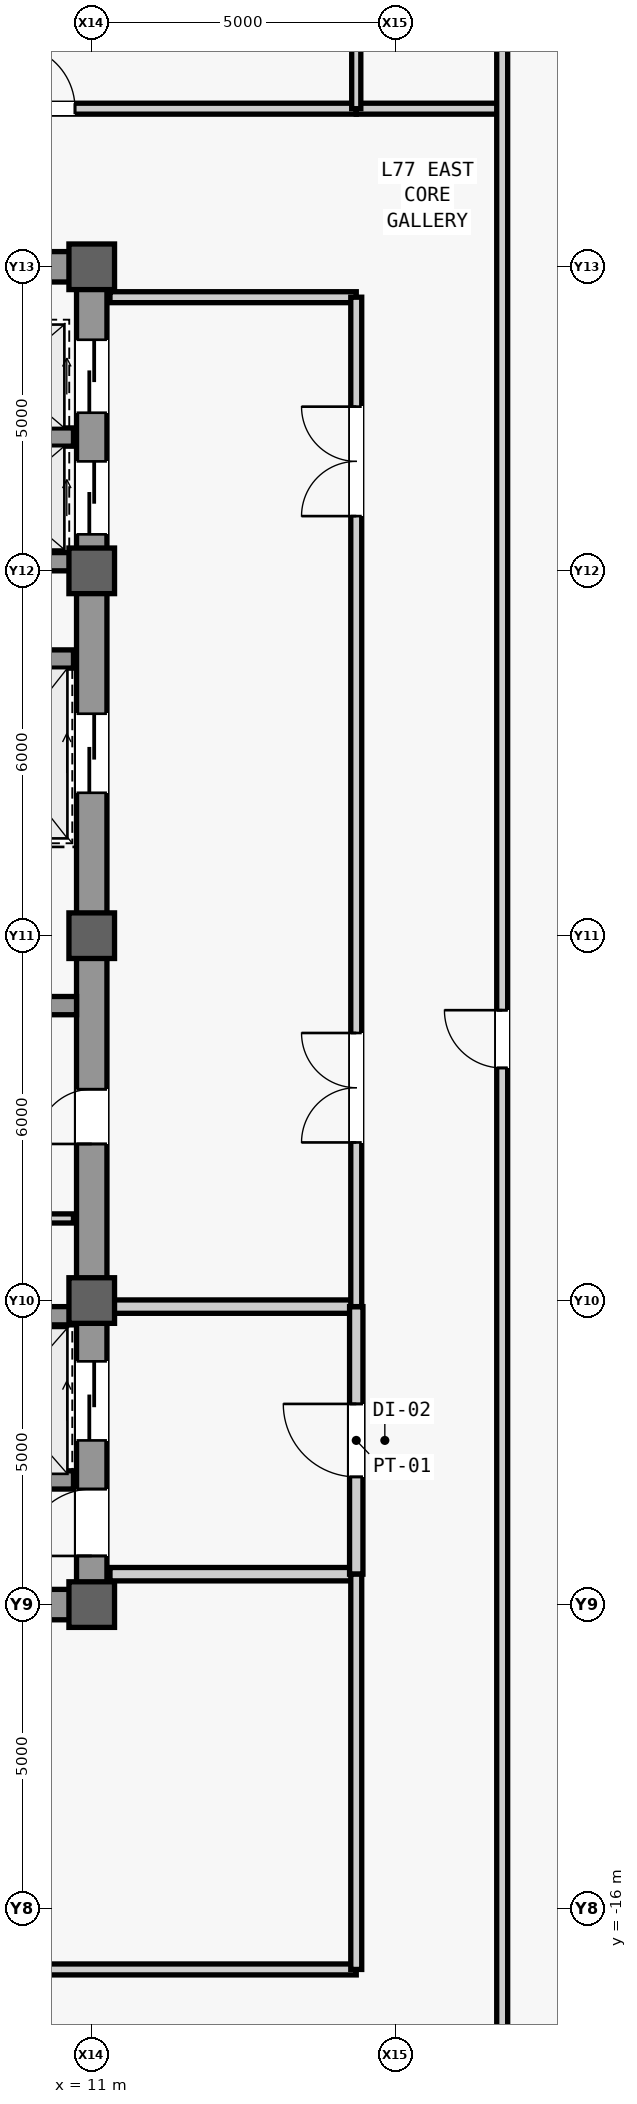
"""IFC4 building model, lengths in metres.
Left out: names, types, materials, properties, quantities, classifications, styles, units other than length and angle.
Written with IfcOpenShell. Run it as: python <this file> out.ifc"""

import sys

from ifc_helpers import new_model, si_unit, direction, frame, frame_2d, origin, origin_2d, place, context, subcontext, project, spatial, rectangle, extrude, source, transform, mapped, element, fill, save


model = new_model("IFC4")
c1 = context("Model", 3, precision=1e-05, world=origin(), true_north=direction((0.0, 1.0)))
c2 = subcontext(c1, "Body", "Model", "MODEL_VIEW")
j1 = project(units=[si_unit("LENGTHUNIT", "METRE"), si_unit("PLANEANGLEUNIT", "RADIAN")], contexts=[c1])
p1 = place(None, origin())
s1 = spatial("IfcSite", under=j1, at=p1, CompositionType="ELEMENT")
p2 = place(p1, origin())
s2 = spatial("IfcBuilding", under=s1, at=p2, CompositionType="ELEMENT")
p3 = place(p2, frame((0.0, 0.0, 326.3)))
s3 = spatial("IfcBuildingStorey", under=s2, at=p3, CompositionType="ELEMENT", Elevation=326.3)
m1 = source(origin(), c2, "Body", "SweptSolid", [
    extrude(rectangle(XDim=22.0, YDim=0.5, at=frame_2d((11.0, 0.0))), origin(), (0.0, 0.0, 1.0), 3.74),
])
p4 = place(p3, frame((11.0, -11.0, 0.0), z_axis=(0.0, 0.0, 1.0), x_axis=(0.0, 1.0, 0.0)))
e1 = element("IfcWall", 1, at=p4, inside=s3, PredefinedType="SHEAR", context=c2, shape_type="MappedRepresentation", body=[
    mapped(m1, transform((0.0, 0.0, 0.0), scale=1.0)),
])
m2 = source(origin(), c2, "Body", "SweptSolid", [
    extrude(rectangle(XDim=1.1, YDim=2.2, at=frame_2d((0.55, 1.1))), frame((0.0, 0.26, 0.0), z_axis=(0.0, -1.0, 0.0), x_axis=(1.0, 0.0, 0.0)), (0.0, 0.0, 1.0), 0.52),
])
p5 = place(p4, frame((0.8, 0.0, 0.0)))
e2 = element("IfcOpeningElement", 2, at=p5, cuts=e1, PredefinedType="OPENING", context=c2, shape_type="MappedRepresentation", body=[
    mapped(m2, transform((0.0, 0.0, 0.0), scale=1.0)),
])
m3 = source(origin(), c2, "Body", "SweptSolid", [
    extrude(rectangle(XDim=0.9, YDim=2.15, at=frame_2d((0.45, 1.075))), frame((0.0, 0.26, 0.0), z_axis=(0.0, -1.0, 0.0), x_axis=(1.0, 0.0, 0.0)), (0.0, 0.0, 1.0), 0.52),
])
p6 = place(p4, frame((7.575, 0.0, 0.0)))
e3 = element("IfcOpeningElement", 3, at=p6, cuts=e1, PredefinedType="OPENING", context=c2, shape_type="MappedRepresentation", body=[
    mapped(m3, transform((0.0, 0.0, 0.0), scale=1.0)),
])
m4 = source(origin(), c2, "Body", "SweptSolid", [
    extrude(rectangle(XDim=1.2, YDim=2.3, at=frame_2d((0.6, 1.15))), frame((0.0, 0.26, 0.0), z_axis=(0.0, -1.0, 0.0), x_axis=(1.0, 0.0, 0.0)), (0.0, 0.0, 1.0), 0.52),
])
p7 = place(p4, frame((17.6, 0.0, 0.0)))
e4 = element("IfcOpeningElement", 4, at=p7, cuts=e1, PredefinedType="OPENING", context=c2, shape_type="MappedRepresentation", body=[
    mapped(m4, transform((0.0, 0.0, 0.0), scale=1.0)),
])
p8 = place(p4, frame((19.6, 0.0, 0.0)))
e5 = element("IfcOpeningElement", 5, at=p8, cuts=e1, PredefinedType="OPENING", context=c2, shape_type="MappedRepresentation", body=[
    mapped(m4, transform((0.0, 0.0, 0.0), scale=1.0)),
])
m5 = source(origin(), c2, "Body", "SweptSolid", [
    extrude(rectangle(XDim=1.3, YDim=2.3, at=frame_2d((0.65, 1.15))), frame((0.0, 0.26, 0.0), z_axis=(0.0, -1.0, 0.0), x_axis=(1.0, 0.0, 0.0)), (0.0, 0.0, 1.0), 0.52),
])
p9 = place(p4, frame((2.7, 0.0, 0.0)))
e6 = element("IfcOpeningElement", 6, at=p9, cuts=e1, PredefinedType="OPENING", context=c2, shape_type="MappedRepresentation", body=[
    mapped(m5, transform((0.0, 0.0, 0.0), scale=1.0)),
])
p10 = place(p4, frame((13.35, 0.0, 0.0)))
e7 = element("IfcOpeningElement", 7, at=p10, cuts=e1, PredefinedType="OPENING", context=c2, shape_type="MappedRepresentation", body=[
    mapped(m5, transform((0.0, 0.0, 0.0), scale=1.0)),
])
m6 = source(origin(), c2, "Body", "SweptSolid", [
    extrude(rectangle(XDim=5.9, YDim=0.5, at=frame_2d((2.95, 0.0))), origin(), (0.0, 0.0, 1.0), 3.74),
])
p11 = place(p3, frame((4.85, -11.0, 0.0), z_axis=(0.0, 0.0, 1.0), x_axis=(1.0, 0.0, 0.0)))
e8 = element("IfcWall", 8, at=p11, inside=s3, PredefinedType="SHEAR", context=c2, shape_type="MappedRepresentation", body=[
    mapped(m6, transform((0.0, 0.0, 0.0), scale=1.0)),
])
p12 = place(p3, frame((4.85, 11.0, 0.0), z_axis=(0.0, 0.0, 1.0), x_axis=(1.0, 0.0, 0.0)))
e9 = element("IfcWall", 9, at=p12, inside=s3, PredefinedType="SHEAR", context=c2, shape_type="MappedRepresentation", body=[
    mapped(m6, transform((0.0, 0.0, 0.0), scale=1.0)),
])
p13 = place(p12, frame((0.5, 0.0, 0.0)))
e10 = element("IfcOpeningElement", 10, at=p13, cuts=e9, PredefinedType="OPENING", context=c2, shape_type="MappedRepresentation", body=[
    mapped(m3, transform((0.0, 0.0, 0.0), scale=1.0)),
])
m7 = source(origin(), c2, "Body", "SweptSolid", [
    extrude(rectangle(XDim=5.65, YDim=0.3, at=frame_2d((2.825, 0.0))), origin(), (0.0, 0.0, 1.0), 3.74),
])
p14 = place(p3, frame((5.1, -1.15, 0.0), z_axis=(0.0, 0.0, 1.0), x_axis=(1.0, 0.0, 0.0)))
e11 = element("IfcWall", 11, at=p14, inside=s3, PredefinedType="SHEAR", context=c2, shape_type="MappedRepresentation", body=[
    mapped(m7, transform((0.0, 0.0, 0.0), scale=1.0)),
])
m8 = source(origin(), c2, "Body", "SweptSolid", [
    extrude(rectangle(XDim=0.75, YDim=0.75, at=origin_2d()), origin(), (0.0, 0.0, 1.0), 4.0),
])
for number, where, z_axis, x_axis in (
    (12, (11.0, -11.0, 0.0), (0.0, 0.0, 1.0), (1.0, 0.0, 0.0)),
    (13, (11.0, -6.0, 0.0), (0.0, 0.0, 1.0), (1.0, 0.0, 0.0)),
    (14, (11.0, 0.0, 0.0), (0.0, 0.0, 1.0), (1.0, 0.0, 0.0)),
    (15, (11.0, 6.0, 0.0), (0.0, 0.0, 1.0), (1.0, 0.0, 0.0)),
    (16, (11.0, 11.0, 0.0), (0.0, 0.0, 1.0), (1.0, 0.0, 0.0)),
):
    element("IfcColumn", number, at=place(p3, frame(where, z_axis=z_axis, x_axis=x_axis)), inside=s3, PredefinedType="COLUMN", context=c2, shape_type="MappedRepresentation", body=[
        mapped(m8, transform((0.0, 0.0, 0.0), scale=1.0)),
    ])
m9 = source(origin(), c2, "Body", "SweptSolid", [
    extrude(rectangle(XDim=2.2, YDim=0.3, at=frame_2d((1.1, 0.0))), origin(), (0.0, 0.0, 1.0), 3.74),
])
for number, where, z_axis, x_axis in (
    (17, (8.5, -8.95, 0.0), (0.0, 0.0, 1.0), (1.0, 0.0, 0.0)),
    (18, (8.5, -6.25, 0.0), (0.0, 0.0, 1.0), (1.0, 0.0, 0.0)),
):
    element("IfcWall", number, at=place(p3, frame(where, z_axis=z_axis, x_axis=x_axis)), inside=s3, PredefinedType="SHEAR", context=c2, shape_type="MappedRepresentation", body=[
        mapped(m9, transform((0.0, 0.0, 0.0), scale=1.0)),
    ])
m10 = source(origin(), c2, "Body", "SweptSolid", [
    extrude(rectangle(XDim=2.3, YDim=0.3, at=frame_2d((1.15, 0.0))), origin(), (0.0, 0.0, 1.0), 3.74),
])
for number, where, z_axis, x_axis in (
    (19, (8.4, 4.55, 0.0), (0.0, 0.0, 1.0), (1.0, 0.0, 0.0)),
    (20, (8.4, 6.15, 0.0), (0.0, 0.0, 1.0), (1.0, 0.0, 0.0)),
    (21, (8.4, 8.2, 0.0), (0.0, 0.0, 1.0), (1.0, 0.0, 0.0)),
):
    element("IfcWall", number, at=place(p3, frame(where, z_axis=z_axis, x_axis=x_axis)), inside=s3, PredefinedType="SHEAR", context=c2, shape_type="MappedRepresentation", body=[
        mapped(m10, transform((0.0, 0.0, 0.0), scale=1.0)),
    ])
m11 = source(origin(), c2, "Body", "SweptSolid", [
    extrude(rectangle(XDim=2.05, YDim=0.15, at=frame_2d((1.025, 0.0))), origin(), (0.0, 0.0, 1.0), 3.74),
])
p15 = place(p3, frame((8.65, -4.65, 0.0), z_axis=(0.0, 0.0, 1.0), x_axis=(1.0, 0.0, 0.0)))
e22 = element("IfcWall", 22, at=p15, inside=s3, PredefinedType="PARTITIONING", context=c2, shape_type="MappedRepresentation", body=[
    mapped(m11, transform((0.0, 0.0, 0.0), scale=1.0)),
])
m12 = source(origin(), c2, "Body", "SweptSolid", [
    extrude(rectangle(XDim=4.05, YDim=0.22, at=frame_2d((2.025, 0.0))), origin(), (0.0, 0.0, 1.0), 3.74),
])
p16 = place(p3, frame((11.3, -10.5, 0.0), z_axis=(0.0, 0.0, 1.0), x_axis=(1.0, 0.0, 0.0)))
e23 = element("IfcWall", 23, at=p16, inside=s3, PredefinedType="PARTITIONING", context=c2, shape_type="MappedRepresentation", body=[
    mapped(m12, transform((0.0, 0.0, 0.0), scale=1.0)),
])
m13 = source(origin(), c2, "Body", "SweptSolid", [
    extrude(rectangle(XDim=4.05, YDim=0.22, at=frame_2d((2.025, 0.0))), origin(), (0.0, 0.0, 1.0), 3.124),
])
p17 = place(p3, frame((11.3, -6.1, 0.0), z_axis=(0.0, 0.0, 1.0), x_axis=(1.0, 0.0, 0.0)))
e24 = element("IfcWall", 24, at=p17, inside=s3, PredefinedType="PARTITIONING", context=c2, shape_type="MappedRepresentation", body=[
    mapped(m13, transform((0.0, 0.0, 0.0), scale=1.0)),
])
m14 = source(origin(), c2, "Body", "SweptSolid", [
    extrude(rectangle(XDim=4.4, YDim=0.22, at=frame_2d((2.2, 0.0))), origin(), (0.0, 0.0, 1.0), 3.74),
])
p18 = place(p3, frame((15.35, -10.5, 0.0), z_axis=(0.0, 0.0, 1.0), x_axis=(0.0, 1.0, 0.0)))
e25 = element("IfcWall", 25, at=p18, inside=s3, PredefinedType="PARTITIONING", context=c2, shape_type="MappedRepresentation", body=[
    mapped(m14, transform((0.0, 0.0, 0.0), scale=1.0)),
])
m15 = source(origin(), c2, "Body", "SweptSolid", [
    extrude(rectangle(XDim=1.2, YDim=2.2, at=frame_2d((0.6, 1.1))), frame((0.0, 0.12, 0.0), z_axis=(0.0, -1.0, 0.0), x_axis=(1.0, 0.0, 0.0)), (0.0, 0.0, 1.0), 0.24),
])
p19 = place(p18, frame((1.6, 0.0, 0.0)))
e26 = element("IfcOpeningElement", 26, at=p19, cuts=e25, PredefinedType="OPENING", context=c2, shape_type="MappedRepresentation", body=[
    mapped(m15, transform((0.0, 0.0, 0.0), scale=1.0)),
])
m16 = source(origin(), c2, "Body", "SweptSolid", [
    extrude(rectangle(XDim=4.05, YDim=0.18, at=frame_2d((2.025, 0.0))), origin(), (0.0, 0.0, 1.0), 3.74),
])
p20 = place(p3, frame((11.3, 10.5, 0.0), z_axis=(0.0, 0.0, 1.0), x_axis=(1.0, 0.0, 0.0)))
e27 = element("IfcWall", 27, at=p20, inside=s3, PredefinedType="PARTITIONING", context=c2, shape_type="MappedRepresentation", body=[
    mapped(m16, transform((0.0, 0.0, 0.0), scale=1.0)),
])
m17 = source(origin(), c2, "Body", "SweptSolid", [
    extrude(rectangle(XDim=16.6, YDim=0.18, at=frame_2d((8.3, 0.0))), origin(), (0.0, 0.0, 1.0), 3.74),
])
p21 = place(p3, frame((15.35, -6.1, 0.0), z_axis=(0.0, 0.0, 1.0), x_axis=(0.0, 1.0, 0.0)))
e28 = element("IfcWall", 28, at=p21, inside=s3, PredefinedType="PARTITIONING", context=c2, shape_type="MappedRepresentation", body=[
    mapped(m17, transform((0.0, 0.0, 0.0), scale=1.0)),
])
m18 = source(origin(), c2, "Body", "SweptSolid", [
    extrude(rectangle(XDim=1.8, YDim=2.25, at=frame_2d((0.9, 1.125))), frame((0.0, 0.1, 0.0), z_axis=(0.0, -1.0, 0.0), x_axis=(1.0, 0.0, 0.0)), (0.0, 0.0, 1.0), 0.2),
])
p22 = place(p21, frame((2.7, 0.0, 0.0)))
e29 = element("IfcOpeningElement", 29, at=p22, cuts=e28, PredefinedType="OPENING", context=c2, shape_type="MappedRepresentation", body=[
    mapped(m18, transform((0.0, 0.0, 0.0), scale=1.0)),
])
p23 = place(p21, frame((13.0, 0.0, 0.0)))
e30 = element("IfcOpeningElement", 30, at=p23, cuts=e28, PredefinedType="OPENING", context=c2, shape_type="MappedRepresentation", body=[
    mapped(m18, transform((0.0, 0.0, 0.0), scale=1.0)),
])
m19 = source(origin(), c2, "Body", "SweptSolid", [
    extrude(rectangle(XDim=14.05, YDim=0.18, at=frame_2d((7.025, 0.0))), origin(), (0.0, 0.0, 1.0), 3.74),
])
p24 = place(p3, frame((1.3, -17.0, 0.0), z_axis=(0.0, 0.0, 1.0), x_axis=(1.0, 0.0, 0.0)))
e31 = element("IfcWall", 31, at=p24, inside=s3, PredefinedType="PARTITIONING", context=c2, shape_type="MappedRepresentation", body=[
    mapped(m19, transform((0.0, 0.0, 0.0), scale=1.0)),
])
m20 = source(origin(), c2, "Body", "SweptSolid", [
    extrude(rectangle(XDim=0.9, YDim=2.15, at=frame_2d((0.45, 1.075))), frame((0.0, 0.1, 0.0), z_axis=(0.0, -1.0, 0.0), x_axis=(1.0, 0.0, 0.0)), (0.0, 0.0, 1.0), 0.2),
])
p25 = place(p24, frame((6.25, 0.0, 0.0)))
e32 = element("IfcOpeningElement", 32, at=p25, cuts=e31, PredefinedType="OPENING", context=c2, shape_type="MappedRepresentation", body=[
    mapped(m20, transform((0.0, 0.0, 0.0), scale=1.0)),
])
m21 = source(origin(), c2, "Body", "SweptSolid", [
    extrude(rectangle(XDim=6.5, YDim=0.18, at=frame_2d((3.25, 0.0))), origin(), (0.0, 0.0, 1.0), 3.74),
])
p26 = place(p3, frame((15.35, -17.0, 0.0), z_axis=(0.0, 0.0, 1.0), x_axis=(0.0, 1.0, 0.0)))
e33 = element("IfcWall", 33, at=p26, inside=s3, PredefinedType="PARTITIONING", context=c2, shape_type="MappedRepresentation", body=[
    mapped(m21, transform((0.0, 0.0, 0.0), scale=1.0)),
])
m22 = source(origin(), c2, "Body", "SweptSolid", [
    extrude(rectangle(XDim=2.4, YDim=0.18, at=frame_2d((1.2, 0.0))), origin(), (0.0, 0.0, 1.0), 3.74),
])
p27 = place(p3, frame((15.35, 13.6, 0.0), z_axis=(0.0, 0.0, 1.0), x_axis=(1.0, 0.0, 0.0)))
e34 = element("IfcWall", 34, at=p27, inside=s3, PredefinedType="PARTITIONING", context=c2, shape_type="MappedRepresentation", body=[
    mapped(m22, transform((0.0, 0.0, 0.0), scale=1.0)),
])
m23 = source(origin(), c2, "Body", "SweptSolid", [
    extrude(rectangle(XDim=32.75, YDim=0.18, at=frame_2d((16.375, 0.0))), origin(), (0.0, 0.0, 1.0), 3.74),
])
p28 = place(p3, frame((-17.4, 13.6, 0.0), z_axis=(0.0, 0.0, 1.0), x_axis=(1.0, 0.0, 0.0)))
e35 = element("IfcWall", 35, at=p28, inside=s3, PredefinedType="PARTITIONING", context=c2, shape_type="MappedRepresentation", body=[
    mapped(m23, transform((0.0, 0.0, 0.0), scale=1.0)),
])
m24 = source(origin(), c2, "Body", "SweptSolid", [
    extrude(rectangle(XDim=1.05, YDim=2.2, at=frame_2d((0.525, 1.1))), frame((0.0, 0.1, 0.0), z_axis=(0.0, -1.0, 0.0), x_axis=(1.0, 0.0, 0.0)), (0.0, 0.0, 1.0), 0.2),
])
p29 = place(p28, frame((27.075, 0.0, 0.0)))
e36 = element("IfcOpeningElement", 36, at=p29, cuts=e35, PredefinedType="OPENING", context=c2, shape_type="MappedRepresentation", body=[
    mapped(m24, transform((0.0, 0.0, 0.0), scale=1.0)),
])
m25 = source(origin(), c2, "Body", "SweptSolid", [
    extrude(rectangle(XDim=12.4, YDim=0.15, at=frame_2d((6.2, 0.0))), origin(), (0.0, 0.0, 1.0), 3.74),
])
p30 = place(p3, frame((15.35, 13.6, 0.0), z_axis=(0.0, 0.0, 1.0), x_axis=(0.0, 1.0, 0.0)))
e37 = element("IfcWall", 37, at=p30, inside=s3, PredefinedType="PARTITIONING", context=c2, shape_type="MappedRepresentation", body=[
    mapped(m25, transform((0.0, 0.0, 0.0), scale=1.0)),
])
m26 = source(origin(), c2, "Body", "SweptSolid", [
    extrude(rectangle(XDim=39.4, YDim=0.18, at=frame_2d((19.7, 0.0))), origin(), (0.0, 0.0, 1.0), 3.74),
])
p31 = place(p3, frame((17.75, -19.4, 0.0), z_axis=(0.0, 0.0, 1.0), x_axis=(0.0, 1.0, 0.0)))
e38 = element("IfcWall", 38, at=p31, inside=s3, PredefinedType="PARTITIONING", context=c2, shape_type="MappedRepresentation", body=[
    mapped(m26, transform((0.0, 0.0, 0.0), scale=1.0)),
])
m27 = source(origin(), c2, "Body", "SweptSolid", [
    extrude(rectangle(XDim=0.95, YDim=2.15, at=frame_2d((0.475, 1.075))), frame((0.0, 0.1, 0.0), z_axis=(0.0, -1.0, 0.0), x_axis=(1.0, 0.0, 0.0)), (0.0, 0.0, 1.0), 0.2),
])
p32 = place(p31, frame((17.225, 0.0, 0.0)))
e39 = element("IfcOpeningElement", 39, at=p32, cuts=e38, PredefinedType="OPENING", context=c2, shape_type="MappedRepresentation", body=[
    mapped(m27, transform((0.0, 0.0, 0.0), scale=1.0)),
])
m28 = source(origin(), c2, "Body", "SweptSolid", [
    extrude(rectangle(XDim=1.1, YDim=2.2, at=frame_2d((0.55, 1.1))), frame((0.0, 0.025, 0.0), z_axis=(0.0, -1.0, 0.0), x_axis=(1.0, 0.0, 0.0)), (0.0, 0.0, 1.0), 0.05),
])
p33 = place(p5, origin())
e40 = element("IfcDoor", 40, at=p33, inside=s3, OperationType="SINGLE_SWING_LEFT", PredefinedType="DOOR", context=c2, shape_type="MappedRepresentation", body=[
    mapped(m28, transform((0.0, 0.0, 0.0), scale=1.0)),
])
fill(e2, e40)
m29 = source(origin(), c2, "Body", "SweptSolid", [
    extrude(rectangle(XDim=0.9, YDim=2.15, at=frame_2d((0.45, 1.075))), frame((0.0, 0.025, 0.0), z_axis=(0.0, -1.0, 0.0), x_axis=(1.0, 0.0, 0.0)), (0.0, 0.0, 1.0), 0.05),
])
p34 = place(p6, origin())
e41 = element("IfcDoor", 41, at=p34, inside=s3, OperationType="SINGLE_SWING_LEFT", PredefinedType="DOOR", context=c2, shape_type="MappedRepresentation", body=[
    mapped(m29, transform((0.0, 0.0, 0.0), scale=1.0)),
])
fill(e3, e41)
m30 = source(origin(), c2, "Body", "SweptSolid", [
    extrude(rectangle(XDim=1.2, YDim=2.2, at=frame_2d((0.6, 1.1))), frame((0.0, 0.025, 0.0), z_axis=(0.0, -1.0, 0.0), x_axis=(1.0, 0.0, 0.0)), (0.0, 0.0, 1.0), 0.05),
])
p35 = place(p19, origin())
e42 = element("IfcDoor", 42, at=p35, inside=s3, OperationType="SINGLE_SWING_RIGHT", PredefinedType="DOOR", context=c2, shape_type="MappedRepresentation", body=[
    mapped(m30, transform((0.0, 0.0, 0.0), scale=1.0)),
])
fill(e26, e42)
m31 = source(origin(), c2, "Body", "SweptSolid", [
    extrude(rectangle(XDim=1.8, YDim=2.25, at=frame_2d((0.9, 1.125))), frame((0.0, 0.025, 0.0), z_axis=(0.0, -1.0, 0.0), x_axis=(1.0, 0.0, 0.0)), (0.0, 0.0, 1.0), 0.05),
])
p36 = place(p22, origin())
e43 = element("IfcDoor", 43, at=p36, inside=s3, OperationType="SINGLE_SWING_RIGHT", PredefinedType="DOOR", context=c2, shape_type="MappedRepresentation", body=[
    mapped(m31, transform((0.0, 0.0, 0.0), scale=1.0)),
])
fill(e29, e43)
p37 = place(p23, origin())
e44 = element("IfcDoor", 44, at=p37, inside=s3, OperationType="SINGLE_SWING_LEFT", PredefinedType="DOOR", context=c2, shape_type="MappedRepresentation", body=[
    mapped(m31, transform((0.0, 0.0, 0.0), scale=1.0)),
])
fill(e30, e44)
m32 = source(origin(), c2, "Body", "SweptSolid", [
    extrude(rectangle(XDim=1.05, YDim=2.2, at=frame_2d((0.525, 1.1))), frame((0.0, 0.025, 0.0), z_axis=(0.0, -1.0, 0.0), x_axis=(1.0, 0.0, 0.0)), (0.0, 0.0, 1.0), 0.05),
])
p38 = place(p29, origin())
e45 = element("IfcDoor", 45, at=p38, inside=s3, OperationType="SINGLE_SWING_LEFT", PredefinedType="DOOR", context=c2, shape_type="MappedRepresentation", body=[
    mapped(m32, transform((0.0, 0.0, 0.0), scale=1.0)),
])
fill(e36, e45)
m33 = source(origin(), c2, "Body", "SweptSolid", [
    extrude(rectangle(XDim=0.95, YDim=2.15, at=frame_2d((0.475, 1.075))), frame((0.0, 0.025, 0.0), z_axis=(0.0, -1.0, 0.0), x_axis=(1.0, 0.0, 0.0)), (0.0, 0.0, 1.0), 0.05),
])
p39 = place(p32, origin())
e46 = element("IfcDoor", 46, at=p39, inside=s3, OperationType="SINGLE_SWING_RIGHT", PredefinedType="DOOR", context=c2, shape_type="MappedRepresentation", body=[
    mapped(m33, transform((0.0, 0.0, 0.0), scale=1.0)),
])
fill(e39, e46)
m34 = source(origin(), c2, "Body", "SweptSolid", [
    extrude(rectangle(XDim=1.2, YDim=2.3, at=frame_2d((0.6, 1.15))), frame((0.0, 0.025, 0.0), z_axis=(0.0, -1.0, 0.0), x_axis=(1.0, 0.0, 0.0)), (0.0, 0.0, 1.0), 0.05),
])
p40 = place(p7, origin())
e47 = element("IfcDoor", 47, at=p40, inside=s3, OperationType="SLIDING_TO_LEFT", PredefinedType="DOOR", context=c2, shape_type="MappedRepresentation", body=[
    mapped(m34, transform((0.0, 0.0, 0.0), scale=1.0)),
])
fill(e4, e47)
p41 = place(p8, origin())
e48 = element("IfcDoor", 48, at=p41, inside=s3, OperationType="SLIDING_TO_LEFT", PredefinedType="DOOR", context=c2, shape_type="MappedRepresentation", body=[
    mapped(m34, transform((0.0, 0.0, 0.0), scale=1.0)),
])
fill(e5, e48)
m35 = source(origin(), c2, "Body", "SweptSolid", [
    extrude(rectangle(XDim=1.3, YDim=2.3, at=frame_2d((0.65, 1.15))), frame((0.0, 0.025, 0.0), z_axis=(0.0, -1.0, 0.0), x_axis=(1.0, 0.0, 0.0)), (0.0, 0.0, 1.0), 0.05),
])
p42 = place(p9, origin())
e49 = element("IfcDoor", 49, at=p42, inside=s3, OperationType="SLIDING_TO_LEFT", PredefinedType="DOOR", context=c2, shape_type="MappedRepresentation", body=[
    mapped(m35, transform((0.0, 0.0, 0.0), scale=1.0)),
])
fill(e6, e49)
p43 = place(p10, origin())
e50 = element("IfcDoor", 50, at=p43, inside=s3, OperationType="SLIDING_TO_LEFT", PredefinedType="DOOR", context=c2, shape_type="MappedRepresentation", body=[
    mapped(m35, transform((0.0, 0.0, 0.0), scale=1.0)),
])
fill(e7, e50)
save(model, sys.argv[1])
